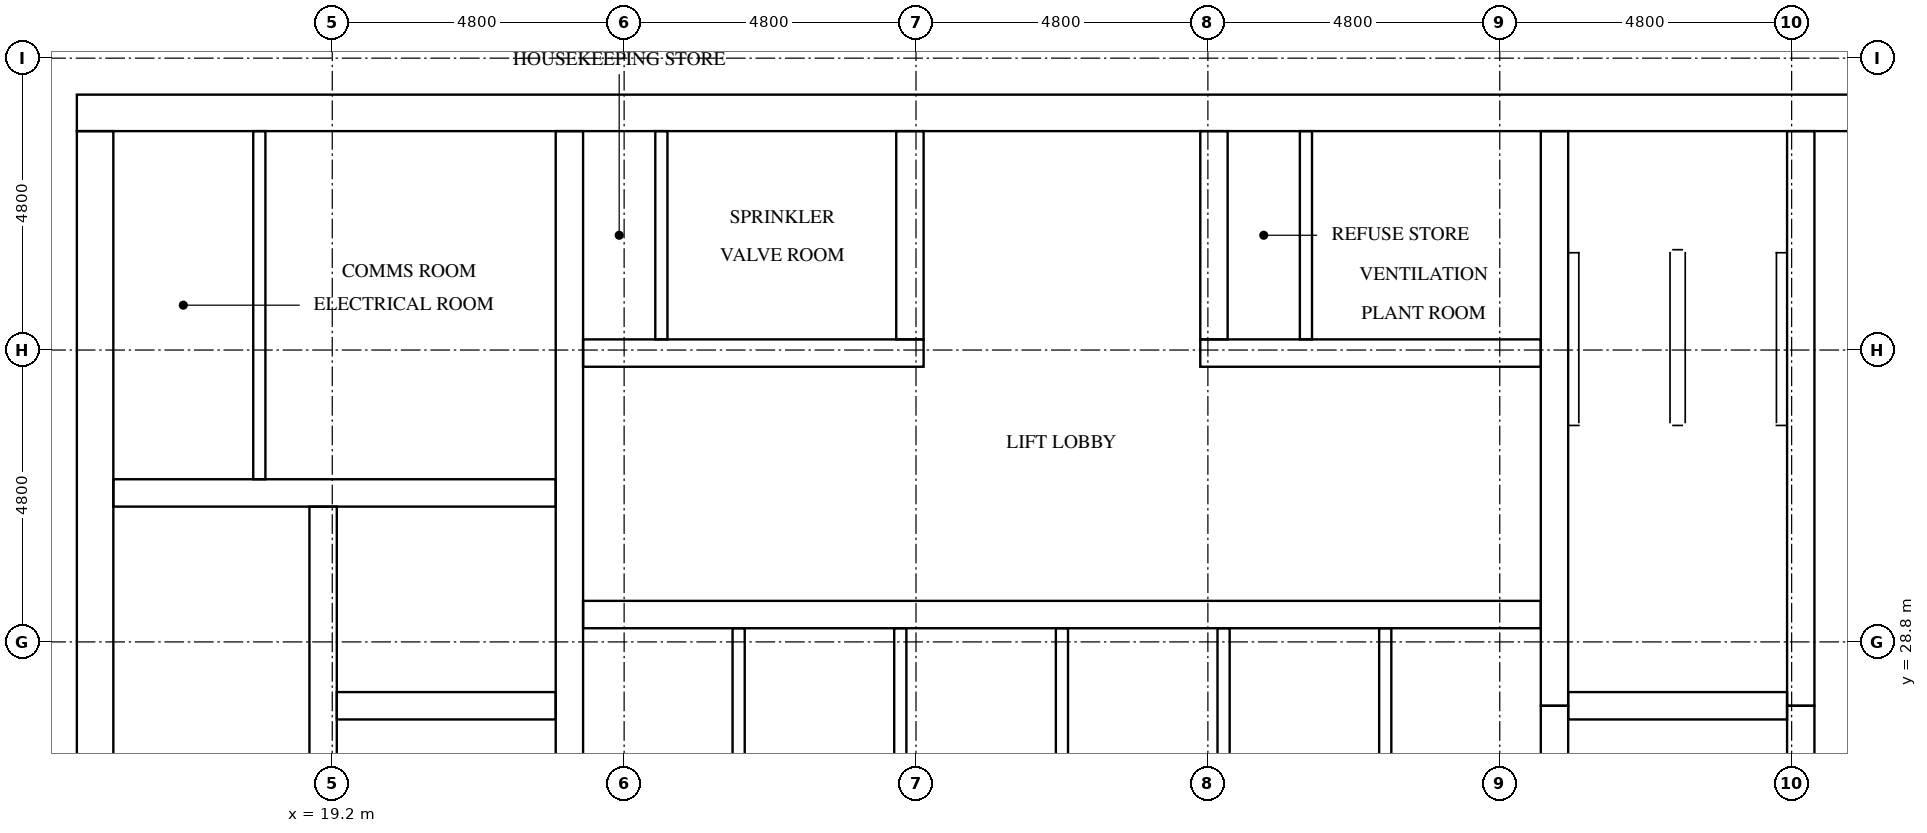
"""IFC4 building model, lengths in metres.
Left out: names, types, materials, properties, quantities, classifications, styles, units other than length and angle.
Written with IfcOpenShell. Run it as: python <this file> out.ifc"""

import sys

from ifc_helpers import new_model, si_unit, direction, frame, frame_2d, origin, place, context, subcontext, project, spatial, rectangle, extrude, element, fill, save


model = new_model("IFC4")
c1 = context("Model", 3, precision=1e-05, world=origin(), true_north=direction((0.0, 1.0)))
c2 = subcontext(c1, "Body", "Model", "MODEL_VIEW")
j1 = project(units=[si_unit("LENGTHUNIT", "METRE"), si_unit("PLANEANGLEUNIT", "RADIAN")], contexts=[c1])
p1 = place(None, origin())
s1 = spatial("IfcSite", under=j1, at=p1, CompositionType="ELEMENT")
p2 = place(p1, origin())
s2 = spatial("IfcBuilding", under=s1, at=p2, CompositionType="ELEMENT")
p3 = place(p2, frame((0.0, 0.0, 256.2)))
s3 = spatial("IfcBuildingStorey", under=s2, at=p3, CompositionType="ELEMENT", Elevation=256.2)
p4 = place(p3, frame((15.0, 37.5, 0.0), z_axis=(0.0, 0.0, 1.0), x_axis=(1.0, 0.0, 0.0)))
e1 = element("IfcWall", 1, at=p4, inside=s3, PredefinedType="SHEAR", context=c2, shape_type="SweptSolid", body=[
    extrude(rectangle(XDim=32.4, YDim=0.6, at=frame_2d((16.2, 0.0))), origin(), (0.0, 0.0, 1.0), 3.2),
])
p5 = place(p4, frame((15.3, 0.0, 0.0)))
e2 = element("IfcOpeningElement", 2, at=p5, cuts=e1, PredefinedType="OPENING", context=c2, shape_type="SweptSolid", body=[
    extrude(rectangle(XDim=1.8, YDim=2.1, at=frame_2d((0.9, 1.05))), frame((0.0, 0.31, 0.0), z_axis=(0.0, -1.0, 0.0), x_axis=(1.0, 0.0, 0.0)), (0.0, 0.0, 1.0), 0.62),
])
p6 = place(p4, frame((1.25, 0.0, 0.0)))
e3 = element("IfcOpeningElement", 3, at=p6, cuts=e1, PredefinedType="OPENING", context=c2, shape_type="SweptSolid", body=[
    extrude(rectangle(XDim=1.0, YDim=2.1, at=frame_2d((0.5, 1.05))), frame((0.0, 0.31, 0.0), z_axis=(0.0, -1.0, 0.0), x_axis=(1.0, 0.0, 0.0)), (0.0, 0.0, 1.0), 0.62),
])
p7 = place(p4, frame((4.988, 0.0, 0.0)))
e4 = element("IfcOpeningElement", 4, at=p7, cuts=e1, PredefinedType="OPENING", context=c2, shape_type="SweptSolid", body=[
    extrude(rectangle(XDim=1.0, YDim=2.1, at=frame_2d((0.5, 1.05))), frame((0.0, 0.31, 0.0), z_axis=(0.0, -1.0, 0.0), x_axis=(1.0, 0.0, 0.0)), (0.0, 0.0, 1.0), 0.62),
])
p8 = place(p3, frame((15.3, 15.6, 0.0), z_axis=(0.0, 0.0, 1.0), x_axis=(0.0, 1.0, 0.0)))
e5 = element("IfcWall", 5, at=p8, inside=s3, PredefinedType="SHEAR", context=c2, shape_type="SweptSolid", body=[
    extrude(rectangle(XDim=21.6, YDim=0.6, at=frame_2d((10.8, 0.0))), origin(), (0.0, 0.0, 1.0), 3.2),
])
p9 = place(p8, frame((5.16, 0.0, 0.0)))
e6 = element("IfcOpeningElement", 6, at=p9, cuts=e5, PredefinedType="OPENING", context=c2, shape_type="SweptSolid", body=[
    extrude(rectangle(XDim=1.2, YDim=2.1, at=frame_2d((0.6, 1.05))), frame((0.0, 0.31, 0.0), z_axis=(0.0, -1.0, 0.0), x_axis=(1.0, 0.0, 0.0)), (0.0, 0.0, 1.0), 0.62),
])
p10 = place(p3, frame((19.05, 15.6, 0.0), z_axis=(0.0, 0.0, 1.0), x_axis=(0.0, 1.0, 0.0)))
e7 = element("IfcWall", 7, at=p10, inside=s3, PredefinedType="SHEAR", context=c2, shape_type="SweptSolid", body=[
    extrude(rectangle(XDim=15.425, YDim=0.45, at=frame_2d((7.712, 0.0))), origin(), (0.0, 0.0, 1.0), 3.2),
])
p11 = place(p10, frame((9.85, 0.0, 0.0)))
e8 = element("IfcOpeningElement", 8, at=p11, cuts=e7, PredefinedType="OPENING", context=c2, shape_type="SweptSolid", body=[
    extrude(rectangle(XDim=1.1, YDim=2.1, at=frame_2d((0.55, 1.05))), frame((0.0, 0.235, 0.0), z_axis=(0.0, -1.0, 0.0), x_axis=(1.0, 0.0, 0.0)), (0.0, 0.0, 1.0), 0.47),
])
p12 = place(p10, frame((13.35, 0.0, 0.0)))
e9 = element("IfcOpeningElement", 9, at=p12, cuts=e7, PredefinedType="OPENING", context=c2, shape_type="SweptSolid", body=[
    extrude(rectangle(XDim=1.1, YDim=2.1, at=frame_2d((0.55, 1.05))), frame((0.0, 0.235, 0.0), z_axis=(0.0, -1.0, 0.0), x_axis=(1.0, 0.0, 0.0)), (0.0, 0.0, 1.0), 0.47),
])
p13 = place(p10, frame((0.6, 0.0, 0.0)))
e10 = element("IfcOpeningElement", 10, at=p13, cuts=e7, PredefinedType="OPENING", context=c2, shape_type="SweptSolid", body=[
    extrude(rectangle(XDim=1.2, YDim=2.1, at=frame_2d((0.6, 1.05))), frame((0.0, 0.235, 0.0), z_axis=(0.0, -1.0, 0.0), x_axis=(1.0, 0.0, 0.0)), (0.0, 0.0, 1.0), 0.47),
])
p14 = place(p3, frame((23.1, 15.6, 0.0), z_axis=(0.0, 0.0, 1.0), x_axis=(0.0, 1.0, 0.0)))
e11 = element("IfcWall", 11, at=p14, inside=s3, PredefinedType="SHEAR", context=c2, shape_type="SweptSolid", body=[
    extrude(rectangle(XDim=21.6, YDim=0.45, at=frame_2d((10.8, 0.0))), origin(), (0.0, 0.0, 1.0), 3.2),
])
p15 = place(p3, frame((39.3, 24.25, 0.0), z_axis=(0.0, 0.0, 1.0), x_axis=(0.0, 1.0, 0.0)))
e12 = element("IfcWall", 12, at=p15, inside=s3, PredefinedType="SHEAR", context=c2, shape_type="SweptSolid", body=[
    extrude(rectangle(XDim=3.5, YDim=0.45, at=frame_2d((1.75, 0.0))), origin(), (0.0, 0.0, 1.0), 3.2),
])
p16 = place(p3, frame((39.3, 27.75, 0.0), z_axis=(0.0, 0.0, 1.0), x_axis=(0.0, 1.0, 0.0)))
e13 = element("IfcWall", 13, at=p16, inside=s3, PredefinedType="SHEAR", context=c2, shape_type="SweptSolid", body=[
    extrude(rectangle(XDim=9.45, YDim=0.45, at=frame_2d((4.725, 0.0))), origin(), (0.0, 0.0, 1.0), 3.2),
])
p17 = place(p3, frame((43.35, 24.25, 0.0), z_axis=(0.0, 0.0, 1.0), x_axis=(0.0, 1.0, 0.0)))
e14 = element("IfcWall", 14, at=p17, inside=s3, PredefinedType="SHEAR", context=c2, shape_type="SweptSolid", body=[
    extrude(rectangle(XDim=3.5, YDim=0.45, at=frame_2d((1.75, 0.0))), origin(), (0.0, 0.0, 1.0), 3.2),
])
p18 = place(p17, frame((1.2, 0.0, 0.0)))
e15 = element("IfcOpeningElement", 15, at=p18, cuts=e14, PredefinedType="OPENING", context=c2, shape_type="SweptSolid", body=[
    extrude(rectangle(XDim=1.1, YDim=2.1, at=frame_2d((0.55, 1.05))), frame((0.0, 0.235, 0.0), z_axis=(0.0, -1.0, 0.0), x_axis=(1.0, 0.0, 0.0)), (0.0, 0.0, 1.0), 0.47),
])
p19 = place(p3, frame((43.35, 27.75, 0.0), z_axis=(0.0, 0.0, 1.0), x_axis=(0.0, 1.0, 0.0)))
e16 = element("IfcWall", 16, at=p19, inside=s3, PredefinedType="SHEAR", context=c2, shape_type="SweptSolid", body=[
    extrude(rectangle(XDim=9.45, YDim=0.45, at=frame_2d((4.725, 0.0))), origin(), (0.0, 0.0, 1.0), 3.2),
])
p20 = place(p19, frame((7.65, 0.0, 0.0)))
e17 = element("IfcOpeningElement", 17, at=p20, cuts=e16, PredefinedType="OPENING", context=c2, shape_type="SweptSolid", body=[
    extrude(rectangle(XDim=1.2, YDim=2.1, at=frame_2d((0.6, 1.05))), frame((0.0, 0.235, 0.0), z_axis=(0.0, -1.0, 0.0), x_axis=(1.0, 0.0, 0.0)), (0.0, 0.0, 1.0), 0.47),
])
p21 = place(p3, frame((19.275, 27.75, 0.0), z_axis=(0.0, 0.0, 1.0), x_axis=(1.0, 0.0, 0.0)))
e18 = element("IfcWall", 18, at=p21, inside=s3, PredefinedType="SHEAR", context=c2, shape_type="SweptSolid", body=[
    extrude(rectangle(XDim=3.6, YDim=0.45, at=frame_2d((1.8, 0.0))), origin(), (0.0, 0.0, 1.0), 3.2),
])
p22 = place(p3, frame((15.6, 31.25, 0.0), z_axis=(0.0, 0.0, 1.0), x_axis=(1.0, 0.0, 0.0)))
e19 = element("IfcWall", 19, at=p22, inside=s3, PredefinedType="SHEAR", context=c2, shape_type="SweptSolid", body=[
    extrude(rectangle(XDim=7.275, YDim=0.45, at=frame_2d((3.637, 0.0))), origin(), (0.0, 0.0, 1.0), 3.2),
])
p23 = place(p3, frame((39.525, 27.75, 0.0), z_axis=(0.0, 0.0, 1.0), x_axis=(1.0, 0.0, 0.0)))
e20 = element("IfcWall", 20, at=p23, inside=s3, PredefinedType="SHEAR", context=c2, shape_type="SweptSolid", body=[
    extrude(rectangle(XDim=3.6, YDim=0.45, at=frame_2d((1.8, 0.0))), origin(), (0.0, 0.0, 1.0), 3.2),
])
p24 = place(p3, frame((23.325, 29.25, 0.0), z_axis=(0.0, 0.0, 1.0), x_axis=(1.0, 0.0, 0.0)))
e21 = element("IfcWall", 21, at=p24, inside=s3, PredefinedType="SHEAR", context=c2, shape_type="SweptSolid", body=[
    extrude(rectangle(XDim=15.75, YDim=0.45, at=frame_2d((7.875, 0.0))), origin(), (0.0, 0.0, 1.0), 3.2),
])
p25 = place(p24, frame((0.679, 0.0, 0.0)))
e22 = element("IfcOpeningElement", 22, at=p25, cuts=e21, PredefinedType="OPENING", context=c2, shape_type="SweptSolid", body=[
    extrude(rectangle(XDim=1.1, YDim=2.1, at=frame_2d((0.55, 1.05))), frame((0.0, 0.235, 0.0), z_axis=(0.0, -1.0, 0.0), x_axis=(1.0, 0.0, 0.0)), (0.0, 0.0, 1.0), 0.47),
])
p26 = place(p24, frame((3.337, 0.0, 0.0)))
e23 = element("IfcOpeningElement", 23, at=p26, cuts=e21, PredefinedType="OPENING", context=c2, shape_type="SweptSolid", body=[
    extrude(rectangle(XDim=1.1, YDim=2.1, at=frame_2d((0.55, 1.05))), frame((0.0, 0.235, 0.0), z_axis=(0.0, -1.0, 0.0), x_axis=(1.0, 0.0, 0.0)), (0.0, 0.0, 1.0), 0.47),
])
p27 = place(p24, frame((5.996, 0.0, 0.0)))
e24 = element("IfcOpeningElement", 24, at=p27, cuts=e21, PredefinedType="OPENING", context=c2, shape_type="SweptSolid", body=[
    extrude(rectangle(XDim=1.1, YDim=2.1, at=frame_2d((0.55, 1.05))), frame((0.0, 0.235, 0.0), z_axis=(0.0, -1.0, 0.0), x_axis=(1.0, 0.0, 0.0)), (0.0, 0.0, 1.0), 0.47),
])
p28 = place(p24, frame((8.654, 0.0, 0.0)))
e25 = element("IfcOpeningElement", 25, at=p28, cuts=e21, PredefinedType="OPENING", context=c2, shape_type="SweptSolid", body=[
    extrude(rectangle(XDim=1.1, YDim=2.1, at=frame_2d((0.55, 1.05))), frame((0.0, 0.235, 0.0), z_axis=(0.0, -1.0, 0.0), x_axis=(1.0, 0.0, 0.0)), (0.0, 0.0, 1.0), 0.47),
])
p29 = place(p24, frame((11.312, 0.0, 0.0)))
e26 = element("IfcOpeningElement", 26, at=p29, cuts=e21, PredefinedType="OPENING", context=c2, shape_type="SweptSolid", body=[
    extrude(rectangle(XDim=1.1, YDim=2.1, at=frame_2d((0.55, 1.05))), frame((0.0, 0.235, 0.0), z_axis=(0.0, -1.0, 0.0), x_axis=(1.0, 0.0, 0.0)), (0.0, 0.0, 1.0), 0.47),
])
p30 = place(p24, frame((13.971, 0.0, 0.0)))
e27 = element("IfcOpeningElement", 27, at=p30, cuts=e21, PredefinedType="OPENING", context=c2, shape_type="SweptSolid", body=[
    extrude(rectangle(XDim=1.1, YDim=2.1, at=frame_2d((0.55, 1.05))), frame((0.0, 0.235, 0.0), z_axis=(0.0, -1.0, 0.0), x_axis=(1.0, 0.0, 0.0)), (0.0, 0.0, 1.0), 0.47),
])
p31 = place(p3, frame((23.325, 33.55, 0.0), z_axis=(0.0, 0.0, 1.0), x_axis=(1.0, 0.0, 0.0)))
e28 = element("IfcWall", 28, at=p31, inside=s3, PredefinedType="SHEAR", context=c2, shape_type="SweptSolid", body=[
    extrude(rectangle(XDim=5.6, YDim=0.45, at=frame_2d((2.8, 0.0))), origin(), (0.0, 0.0, 1.0), 3.2),
])
p32 = place(p31, frame((0.094, 0.0, 0.0)))
e29 = element("IfcOpeningElement", 29, at=p32, cuts=e28, PredefinedType="OPENING", context=c2, shape_type="SweptSolid", body=[
    extrude(rectangle(XDim=1.0, YDim=2.1, at=frame_2d((0.5, 1.05))), frame((0.0, 0.235, 0.0), z_axis=(0.0, -1.0, 0.0), x_axis=(1.0, 0.0, 0.0)), (0.0, 0.0, 1.0), 0.47),
])
p33 = place(p31, frame((2.769, 0.0, 0.0)))
e30 = element("IfcOpeningElement", 30, at=p33, cuts=e28, PredefinedType="OPENING", context=c2, shape_type="SweptSolid", body=[
    extrude(rectangle(XDim=1.0, YDim=2.1, at=frame_2d((0.5, 1.05))), frame((0.0, 0.235, 0.0), z_axis=(0.0, -1.0, 0.0), x_axis=(1.0, 0.0, 0.0)), (0.0, 0.0, 1.0), 0.47),
])
p34 = place(p3, frame((33.475, 33.55, 0.0), z_axis=(0.0, 0.0, 1.0), x_axis=(1.0, 0.0, 0.0)))
e31 = element("IfcWall", 31, at=p34, inside=s3, PredefinedType="SHEAR", context=c2, shape_type="SweptSolid", body=[
    extrude(rectangle(XDim=5.6, YDim=0.45, at=frame_2d((2.8, 0.0))), origin(), (0.0, 0.0, 1.0), 3.2),
])
p35 = place(p34, frame((0.544, 0.0, 0.0)))
e32 = element("IfcOpeningElement", 32, at=p35, cuts=e31, PredefinedType="OPENING", context=c2, shape_type="SweptSolid", body=[
    extrude(rectangle(XDim=1.0, YDim=2.1, at=frame_2d((0.5, 1.05))), frame((0.0, 0.235, 0.0), z_axis=(0.0, -1.0, 0.0), x_axis=(1.0, 0.0, 0.0)), (0.0, 0.0, 1.0), 0.47),
])
p36 = place(p34, frame((3.219, 0.0, 0.0)))
e33 = element("IfcOpeningElement", 33, at=p36, cuts=e31, PredefinedType="OPENING", context=c2, shape_type="SweptSolid", body=[
    extrude(rectangle(XDim=1.0, YDim=2.1, at=frame_2d((0.5, 1.05))), frame((0.0, 0.235, 0.0), z_axis=(0.0, -1.0, 0.0), x_axis=(1.0, 0.0, 0.0)), (0.0, 0.0, 1.0), 0.47),
])
for number, where, z_axis, x_axis in (
    (34, (28.7, 33.775, 0.0), (0.0, 0.0, 1.0), (0.0, 1.0, 0.0)),
    (35, (33.7, 33.775, 0.0), (0.0, 0.0, 1.0), (0.0, 1.0, 0.0)),
):
    element("IfcWall", number, at=place(p3, frame(where, z_axis=z_axis, x_axis=x_axis)), inside=s3, PredefinedType="SHEAR", context=c2, shape_type="SweptSolid", body=[
        extrude(rectangle(XDim=3.425, YDim=0.45, at=frame_2d((1.712, 0.0))), origin(), (0.0, 0.0, 1.0), 3.2),
    ])
for number, where, z_axis, x_axis in (
    (36, (25.883, 26.375, 0.0), (0.0, 0.0, 1.0), (0.0, 1.0, 0.0)),
    (37, (28.542, 26.375, 0.0), (0.0, 0.0, 1.0), (0.0, 1.0, 0.0)),
    (38, (31.2, 26.375, 0.0), (0.0, 0.0, 1.0), (0.0, 1.0, 0.0)),
    (39, (33.858, 26.375, 0.0), (0.0, 0.0, 1.0), (0.0, 1.0, 0.0)),
    (40, (36.517, 26.375, 0.0), (0.0, 0.0, 1.0), (0.0, 1.0, 0.0)),
):
    element("IfcWall", number, at=place(p3, frame(where, z_axis=z_axis, x_axis=x_axis)), inside=s3, PredefinedType="SOLIDWALL", context=c2, shape_type="SweptSolid", body=[
        extrude(rectangle(XDim=2.65, YDim=0.2, at=frame_2d((1.325, 0.0))), origin(), (0.0, 0.0, 1.0), 3.2),
    ])
p37 = place(p3, frame((18.001, 31.475, 0.0), z_axis=(0.0, 0.0, 1.0), x_axis=(0.0, 1.0, 0.0)))
e41 = element("IfcWall", 41, at=p37, inside=s3, PredefinedType="PARTITIONING", context=c2, shape_type="SweptSolid", body=[
    extrude(rectangle(XDim=5.725, YDim=0.2, at=frame_2d((2.862, 0.0))), origin(), (0.0, 0.0, 1.0), 3.2),
])
for number, where, z_axis, x_axis in (
    (42, (24.613, 33.775, 0.0), (0.0, 0.0, 1.0), (0.0, 1.0, 0.0)),
    (43, (35.212, 33.775, 0.0), (0.0, 0.0, 1.0), (0.0, 1.0, 0.0)),
):
    element("IfcWall", number, at=place(p3, frame(where, z_axis=z_axis, x_axis=x_axis)), inside=s3, PredefinedType="PARTITIONING", context=c2, shape_type="SweptSolid", body=[
        extrude(rectangle(XDim=3.425, YDim=0.2, at=frame_2d((1.712, 0.0))), origin(), (0.0, 0.0, 1.0), 3.2),
    ])
p38 = place(p25, origin())
e44 = element("IfcDoor", 44, at=p38, inside=s3, OperationType="DOUBLE_DOOR_SLIDING", PredefinedType="DOOR", context=c2, shape_type="SweptSolid", body=[
    extrude(rectangle(XDim=1.1, YDim=2.1, at=frame_2d((0.55, 1.05))), frame((0.0, 0.025, 0.0), z_axis=(0.0, -1.0, 0.0), x_axis=(1.0, 0.0, 0.0)), (0.0, 0.0, 1.0), 0.05),
])
fill(e22, e44)
p39 = place(p26, origin())
e45 = element("IfcDoor", 45, at=p39, inside=s3, OperationType="DOUBLE_DOOR_SLIDING", PredefinedType="DOOR", context=c2, shape_type="SweptSolid", body=[
    extrude(rectangle(XDim=1.1, YDim=2.1, at=frame_2d((0.55, 1.05))), frame((0.0, 0.025, 0.0), z_axis=(0.0, -1.0, 0.0), x_axis=(1.0, 0.0, 0.0)), (0.0, 0.0, 1.0), 0.05),
])
fill(e23, e45)
p40 = place(p27, origin())
e46 = element("IfcDoor", 46, at=p40, inside=s3, OperationType="DOUBLE_DOOR_SLIDING", PredefinedType="DOOR", context=c2, shape_type="SweptSolid", body=[
    extrude(rectangle(XDim=1.1, YDim=2.1, at=frame_2d((0.55, 1.05))), frame((0.0, 0.025, 0.0), z_axis=(0.0, -1.0, 0.0), x_axis=(1.0, 0.0, 0.0)), (0.0, 0.0, 1.0), 0.05),
])
fill(e24, e46)
p41 = place(p28, origin())
e47 = element("IfcDoor", 47, at=p41, inside=s3, OperationType="DOUBLE_DOOR_SLIDING", PredefinedType="DOOR", context=c2, shape_type="SweptSolid", body=[
    extrude(rectangle(XDim=1.1, YDim=2.1, at=frame_2d((0.55, 1.05))), frame((0.0, 0.025, 0.0), z_axis=(0.0, -1.0, 0.0), x_axis=(1.0, 0.0, 0.0)), (0.0, 0.0, 1.0), 0.05),
])
fill(e25, e47)
p42 = place(p29, origin())
e48 = element("IfcDoor", 48, at=p42, inside=s3, OperationType="DOUBLE_DOOR_SLIDING", PredefinedType="DOOR", context=c2, shape_type="SweptSolid", body=[
    extrude(rectangle(XDim=1.1, YDim=2.1, at=frame_2d((0.55, 1.05))), frame((0.0, 0.025, 0.0), z_axis=(0.0, -1.0, 0.0), x_axis=(1.0, 0.0, 0.0)), (0.0, 0.0, 1.0), 0.05),
])
fill(e26, e48)
p43 = place(p30, origin())
e49 = element("IfcDoor", 49, at=p43, inside=s3, OperationType="DOUBLE_DOOR_SLIDING", PredefinedType="DOOR", context=c2, shape_type="SweptSolid", body=[
    extrude(rectangle(XDim=1.1, YDim=2.1, at=frame_2d((0.55, 1.05))), frame((0.0, 0.025, 0.0), z_axis=(0.0, -1.0, 0.0), x_axis=(1.0, 0.0, 0.0)), (0.0, 0.0, 1.0), 0.05),
])
fill(e27, e49)
p44 = place(p12, origin())
e50 = element("IfcDoor", 50, at=p44, inside=s3, OperationType="DOUBLE_DOOR_SLIDING", PredefinedType="DOOR", context=c2, shape_type="SweptSolid", body=[
    extrude(rectangle(XDim=1.1, YDim=2.1, at=frame_2d((0.55, 1.05))), frame((0.0, 0.025, 0.0), z_axis=(0.0, -1.0, 0.0), x_axis=(1.0, 0.0, 0.0)), (0.0, 0.0, 1.0), 0.05),
])
fill(e9, e50)
p45 = place(p20, origin())
e51 = element("IfcDoor", 51, at=p45, inside=s3, OperationType="SINGLE_SWING_LEFT", PredefinedType="DOOR", context=c2, shape_type="SweptSolid", body=[
    extrude(rectangle(XDim=1.2, YDim=2.1, at=frame_2d((0.6, 1.05))), frame((0.0, 0.025, 0.0), z_axis=(0.0, -1.0, 0.0), x_axis=(1.0, 0.0, 0.0)), (0.0, 0.0, 1.0), 0.05),
])
fill(e17, e51)
p46 = place(p5, origin())
e52 = element("IfcDoor", 52, at=p46, inside=s3, OperationType="DOUBLE_DOOR_SINGLE_SWING", PredefinedType="DOOR", context=c2, shape_type="SweptSolid", body=[
    extrude(rectangle(XDim=1.8, YDim=2.1, at=frame_2d((0.9, 1.05))), frame((0.0, 0.025, 0.0), z_axis=(0.0, -1.0, 0.0), x_axis=(1.0, 0.0, 0.0)), (0.0, 0.0, 1.0), 0.05),
])
fill(e2, e52)
p47 = place(p6, origin())
e53 = element("IfcDoor", 53, at=p47, inside=s3, OperationType="SINGLE_SWING_RIGHT", PredefinedType="DOOR", context=c2, shape_type="SweptSolid", body=[
    extrude(rectangle(XDim=1.0, YDim=2.1, at=frame_2d((0.5, 1.05))), frame((0.0, 0.025, 0.0), z_axis=(0.0, -1.0, 0.0), x_axis=(1.0, 0.0, 0.0)), (0.0, 0.0, 1.0), 0.05),
])
fill(e3, e53)
p48 = place(p7, origin())
e54 = element("IfcDoor", 54, at=p48, inside=s3, OperationType="SINGLE_SWING_LEFT", PredefinedType="DOOR", context=c2, shape_type="SweptSolid", body=[
    extrude(rectangle(XDim=1.0, YDim=2.1, at=frame_2d((0.5, 1.05))), frame((0.0, 0.025, 0.0), z_axis=(0.0, -1.0, 0.0), x_axis=(1.0, 0.0, 0.0)), (0.0, 0.0, 1.0), 0.05),
])
fill(e4, e54)
p49 = place(p32, frame((1.0, 0.0, 0.0), z_axis=(0.0, 0.0, 1.0), x_axis=(-1.0, 0.0, 0.0)))
e55 = element("IfcDoor", 55, at=p49, inside=s3, OperationType="SINGLE_SWING_RIGHT", PredefinedType="DOOR", context=c2, shape_type="SweptSolid", body=[
    extrude(rectangle(XDim=1.0, YDim=2.1, at=frame_2d((0.5, 1.05))), frame((0.0, 0.025, 0.0), z_axis=(0.0, -1.0, 0.0), x_axis=(1.0, 0.0, 0.0)), (0.0, 0.0, 1.0), 0.05),
])
fill(e29, e55)
p50 = place(p33, frame((1.0, 0.0, 0.0), z_axis=(0.0, 0.0, 1.0), x_axis=(-1.0, 0.0, 0.0)))
e56 = element("IfcDoor", 56, at=p50, inside=s3, OperationType="SINGLE_SWING_LEFT", PredefinedType="DOOR", context=c2, shape_type="SweptSolid", body=[
    extrude(rectangle(XDim=1.0, YDim=2.1, at=frame_2d((0.5, 1.05))), frame((0.0, 0.025, 0.0), z_axis=(0.0, -1.0, 0.0), x_axis=(1.0, 0.0, 0.0)), (0.0, 0.0, 1.0), 0.05),
])
fill(e30, e56)
p51 = place(p35, frame((1.0, 0.0, 0.0), z_axis=(0.0, 0.0, 1.0), x_axis=(-1.0, 0.0, 0.0)))
e57 = element("IfcDoor", 57, at=p51, inside=s3, OperationType="SINGLE_SWING_RIGHT", PredefinedType="DOOR", context=c2, shape_type="SweptSolid", body=[
    extrude(rectangle(XDim=1.0, YDim=2.1, at=frame_2d((0.5, 1.05))), frame((0.0, 0.025, 0.0), z_axis=(0.0, -1.0, 0.0), x_axis=(1.0, 0.0, 0.0)), (0.0, 0.0, 1.0), 0.05),
])
fill(e32, e57)
p52 = place(p36, frame((1.0, 0.0, 0.0), z_axis=(0.0, 0.0, 1.0), x_axis=(-1.0, 0.0, 0.0)))
e58 = element("IfcDoor", 58, at=p52, inside=s3, OperationType="SINGLE_SWING_LEFT", PredefinedType="DOOR", context=c2, shape_type="SweptSolid", body=[
    extrude(rectangle(XDim=1.0, YDim=2.1, at=frame_2d((0.5, 1.05))), frame((0.0, 0.025, 0.0), z_axis=(0.0, -1.0, 0.0), x_axis=(1.0, 0.0, 0.0)), (0.0, 0.0, 1.0), 0.05),
])
fill(e33, e58)
save(model, sys.argv[1])
